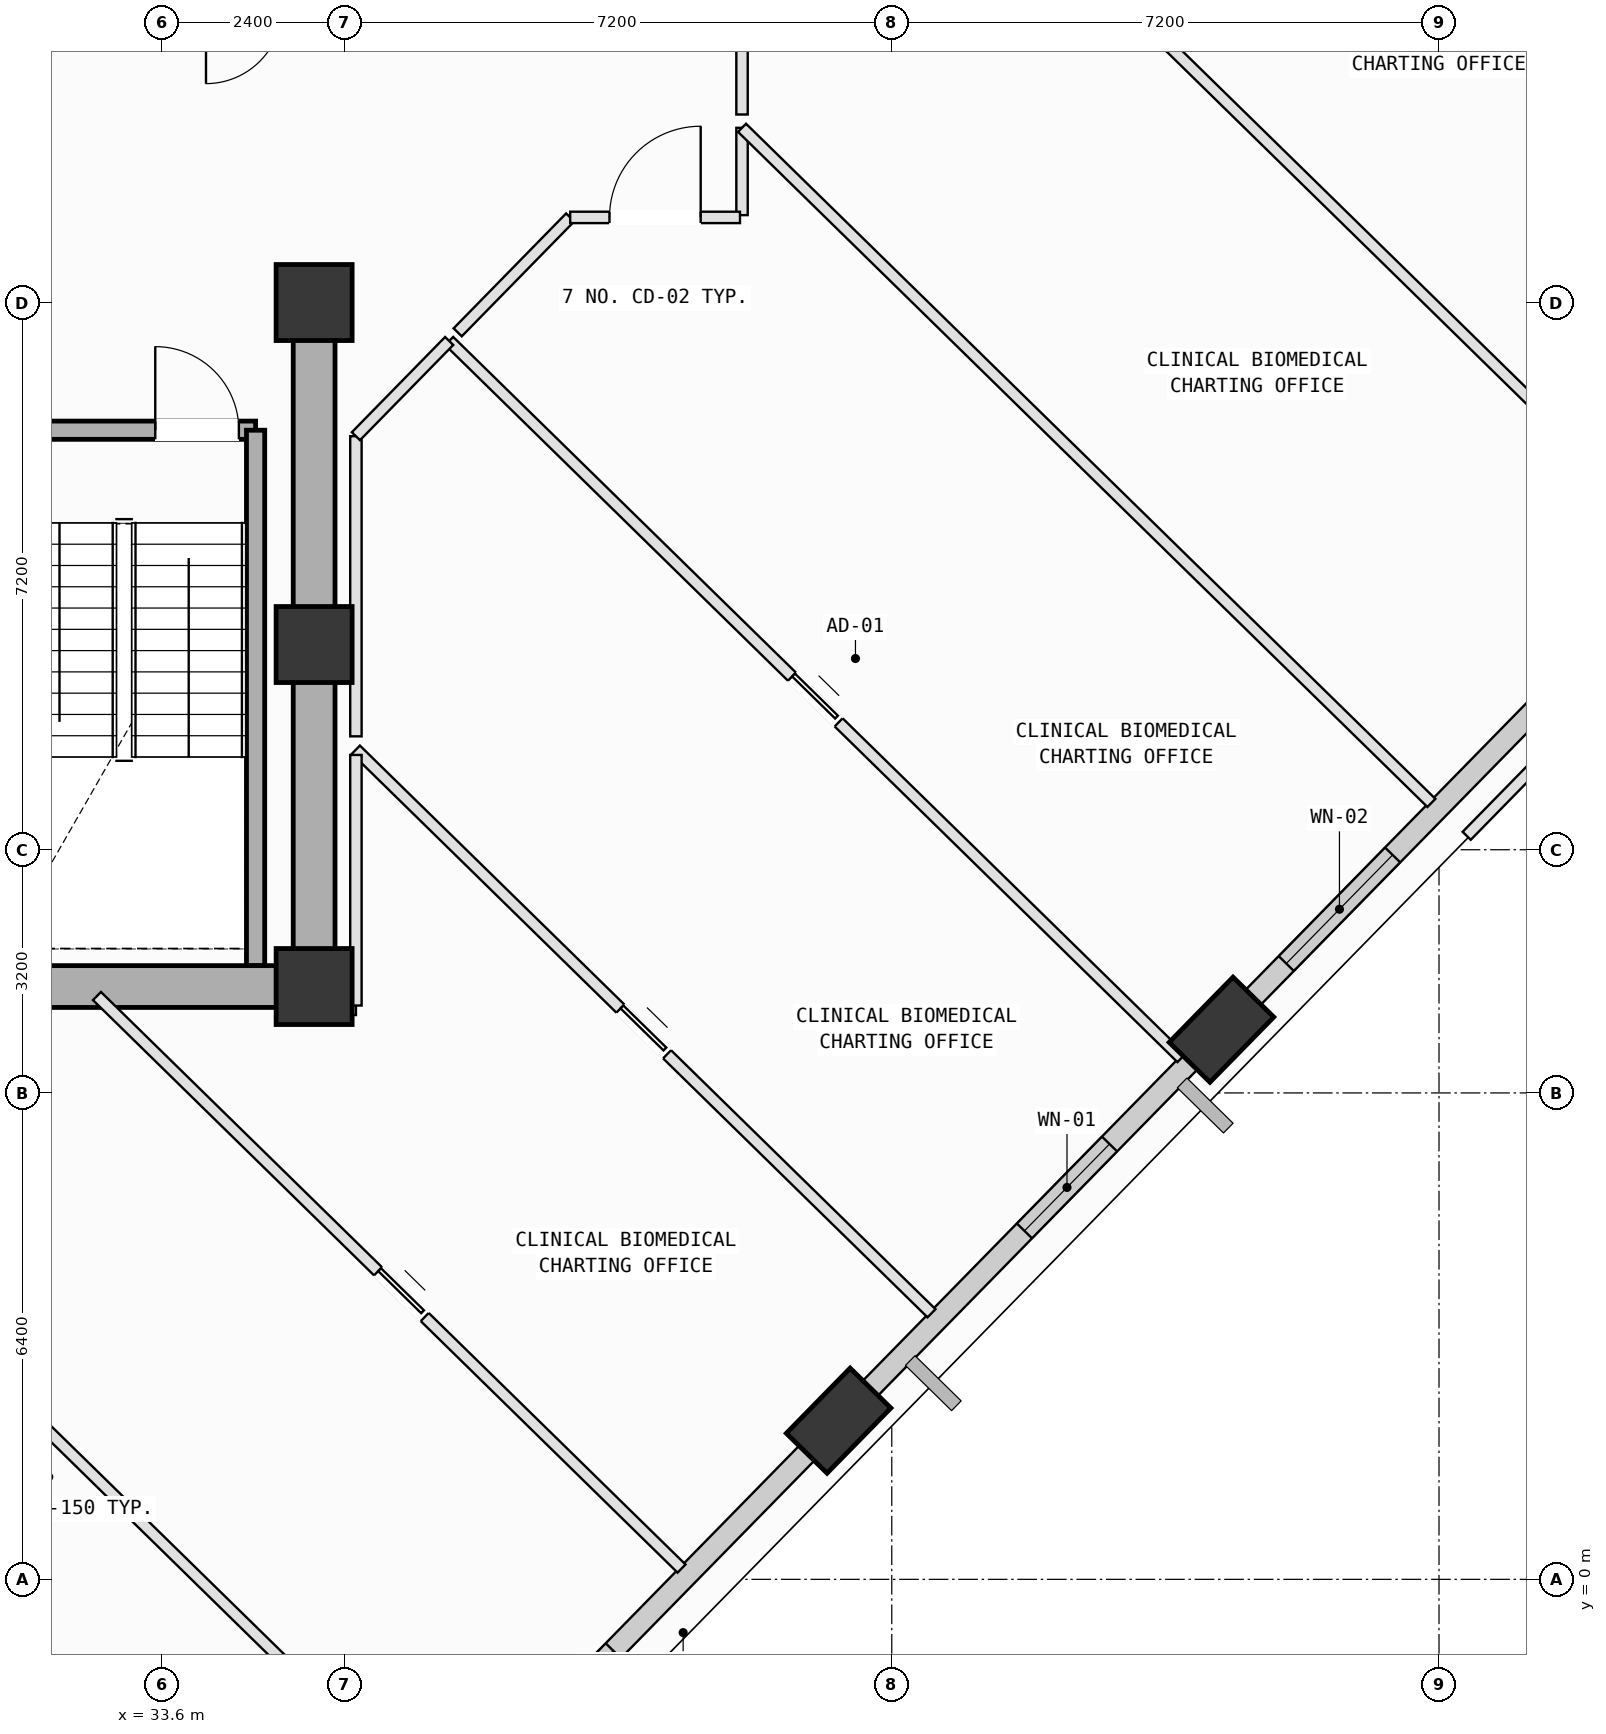
"""IFC4 building model, lengths in metres.
Left out: names, types, materials, properties, quantities, classifications, styles, units other than length and angle.
Written with IfcOpenShell. Run it as: python <this file> out.ifc"""

import sys

from ifc_helpers import new_model, si_unit, direction, frame, frame_2d, origin, origin_2d, place, context, subcontext, project, spatial, rectangle, extrude, element, fill, save


model = new_model("IFC4")
c1 = context("Model", 3, precision=1e-05, world=origin(), true_north=direction((0.0, 1.0)))
c2 = subcontext(c1, "Body", "Model", "MODEL_VIEW")
j1 = project(units=[si_unit("LENGTHUNIT", "METRE"), si_unit("PLANEANGLEUNIT", "RADIAN")], contexts=[c1])
p1 = place(None, origin())
s1 = spatial("IfcSite", under=j1, at=p1, CompositionType="ELEMENT")
p2 = place(p1, origin())
s2 = spatial("IfcBuilding", under=s1, at=p2, CompositionType="ELEMENT")
p3 = place(p2, frame((0.0, 0.0, 219.2)))
s3 = spatial("IfcBuildingStorey", under=s2, at=p3, CompositionType="ELEMENT", Elevation=219.2)
for number, where, z_axis, x_axis in (
    (1, (35.6, 7.8, 0.0), (0.0, 0.0, 1.0), (1.0, 0.0, 0.0)),
    (2, (35.6, 12.3, 0.0), (0.0, 0.0, 1.0), (1.0, 0.0, 0.0)),
    (3, (35.6, 16.8, 0.0), (0.0, 0.0, 1.0), (1.0, 0.0, 0.0)),
):
    element("IfcColumn", number, at=place(p3, frame(where, z_axis=z_axis, x_axis=x_axis)), inside=s3, PredefinedType="COLUMN", context=c2, shape_type="SweptSolid", body=[
        extrude(rectangle(XDim=1.0, YDim=1.0, at=origin_2d()), origin(), (0.0, 0.0, 1.0), 4.0),
    ])
p4 = place(p3, frame((42.5, 2.088, 0.002), z_axis=(0.093359989654, 0.037441245851, 0.994928170996), x_axis=(-0.92020095094, 0.384792535782, 0.071867338176)))
e4 = element("IfcColumn", 4, at=p4, inside=s3, PredefinedType="COLUMN", context=c2, shape_type="SweptSolid", body=[
    extrude(rectangle(XDim=1.2, YDim=0.75, at=origin_2d()), origin(), (0.0, 0.0, 1.0), 4.017),
])
p5 = place(p3, frame((47.538, 7.232, 0.002), z_axis=(0.07202153767, 0.058091696347, 0.995709924088), x_axis=(-0.992992369132, 0.097957283844, 0.066109949232)))
e5 = element("IfcColumn", 5, at=p5, inside=s3, PredefinedType="COLUMN", context=c2, shape_type="SweptSolid", body=[
    extrude(rectangle(XDim=1.2, YDim=0.75, at=origin_2d()), origin(), (0.0, 0.0, 1.0), 4.014),
])
p6 = place(p3, frame((42.358, 1.942, 0.0), z_axis=(0.0, 0.0, 1.0), x_axis=(-0.699673993546, -0.714462247257, 0.0)))
e6 = element("IfcWall", 6, at=p6, inside=s3, PredefinedType="SOLIDWALL", context=c2, shape_type="SweptSolid", body=[
    extrude(rectangle(XDim=6.438, YDim=0.28, at=frame_2d((3.219, 0.0))), origin(), (0.0, 0.0, 1.0), 3.265),
])
p7 = place(p6, frame((4.033, 0.0, 0.75)))
e7 = element("IfcOpeningElement", 7, at=p7, cuts=e6, PredefinedType="OPENING", context=c2, shape_type="SweptSolid", body=[
    extrude(rectangle(XDim=1.2, YDim=1.75, at=frame_2d((0.6, 0.875))), frame((0.0, 0.15, 0.0), z_axis=(0.0, -1.0, 0.0), x_axis=(1.0, 0.0, 0.0)), (0.0, 0.0, 1.0), 0.3),
])
p8 = place(p3, frame((47.389, 7.08, 0.0), z_axis=(0.0, 0.0, 1.0), x_axis=(-0.699664064336, -0.714471970812, 0.0)))
e8 = element("IfcWall", 8, at=p8, inside=s3, PredefinedType="SOLIDWALL", context=c2, shape_type="SweptSolid", body=[
    extrude(rectangle(XDim=6.414, YDim=0.28, at=frame_2d((3.207, 0.0))), origin(), (0.0, 0.0, 1.0), 3.265),
])
p9 = place(p8, frame((1.893, 0.0, 0.75)))
e9 = element("IfcOpeningElement", 9, at=p9, cuts=e8, PredefinedType="OPENING", context=c2, shape_type="SweptSolid", body=[
    extrude(rectangle(XDim=1.6, YDim=1.95, at=frame_2d((0.8, 0.975))), frame((0.0, 0.15, 0.0), z_axis=(0.0, -1.0, 0.0), x_axis=(1.0, 0.0, 0.0)), (0.0, 0.0, 1.0), 0.3),
])
p10 = place(p3, frame((52.427, 12.225, 0.0), z_axis=(0.0, 0.0, 1.0), x_axis=(-0.699656404434, -0.714479471877, 0.0)))
e10 = element("IfcWall", 10, at=p10, inside=s3, PredefinedType="SOLIDWALL", context=c2, shape_type="SweptSolid", body=[
    extrude(rectangle(XDim=6.407, YDim=0.28, at=frame_2d((3.204, 0.0))), origin(), (0.0, 0.0, 1.0), 3.265),
])
p11 = place(p10, frame((3.77, 0.0, 0.75)))
e11 = element("IfcOpeningElement", 11, at=p11, cuts=e10, PredefinedType="OPENING", context=c2, shape_type="SweptSolid", body=[
    extrude(rectangle(XDim=2.0, YDim=1.95, at=frame_2d((1.0, 0.975))), frame((0.0, 0.15, 0.0), z_axis=(0.0, -1.0, 0.0), x_axis=(1.0, 0.0, 0.0)), (0.0, 0.0, 1.0), 0.3),
])
p12 = place(p3, frame((30.265, 19.465, 0.0), z_axis=(0.0, 0.0, 1.0), x_axis=(0.699674545586, 0.714461706643, 0.0)))
e12 = element("IfcWall", 12, at=p12, inside=s3, PredefinedType="SOLIDWALL", context=c2, shape_type="SweptSolid", body=[
    extrude(rectangle(XDim=6.158, YDim=0.28, at=frame_2d((3.079, 0.0))), origin(), (0.0, 0.0, 1.0), 3.165),
])
p13 = place(p12, frame((3.403, 0.0, 0.75)))
e13 = element("IfcOpeningElement", 13, at=p13, cuts=e12, PredefinedType="OPENING", context=c2, shape_type="SweptSolid", body=[
    extrude(rectangle(XDim=1.8, YDim=2.05, at=frame_2d((0.9, 1.025))), frame((0.0, 0.15, 0.0), z_axis=(0.0, -1.0, 0.0), x_axis=(1.0, 0.0, 0.0)), (0.0, 0.0, 1.0), 0.3),
])
p14 = place(p3, frame((31.37, 15.12, 0.0), z_axis=(0.0, 0.0, 1.0), x_axis=(1.0, 0.0, 0.0)))
e14 = element("IfcWall", 14, at=p14, inside=s3, PredefinedType="SOLIDWALL", context=c2, shape_type="SweptSolid", body=[
    extrude(rectangle(XDim=3.46, YDim=0.24, at=frame_2d((1.73, 0.0))), origin(), (0.0, 0.0, 1.0), 3.78),
])
p15 = place(p14, frame((2.14, 0.0, 0.0)))
e15 = element("IfcOpeningElement", 15, at=p15, cuts=e14, PredefinedType="OPENING", context=c2, shape_type="SweptSolid", body=[
    extrude(rectangle(XDim=1.1, YDim=2.15, at=frame_2d((0.55, 1.075))), frame((0.0, 0.13, 0.0), z_axis=(0.0, -1.0, 0.0), x_axis=(1.0, 0.0, 0.0)), (0.0, 0.0, 1.0), 0.26),
])
p16 = place(p3, frame((34.83, 15.12, 0.0), z_axis=(0.0, 0.0, 1.0), x_axis=(0.0, -1.0, 0.0)))
e16 = element("IfcWall", 16, at=p16, inside=s3, PredefinedType="SOLIDWALL", context=c2, shape_type="SweptSolid", body=[
    extrude(rectangle(XDim=7.045, YDim=0.24, at=frame_2d((3.522, 0.0))), origin(), (0.0, 0.0, 1.0), 3.78),
])
p17 = place(p3, frame((24.8, 7.8, 0.0), z_axis=(0.0, 0.0, 1.0), x_axis=(1.0, 0.0, 0.0)))
e17 = element("IfcWall", 17, at=p17, inside=s3, PredefinedType="SHEAR", context=c2, shape_type="SweptSolid", body=[
    extrude(rectangle(XDim=10.8, YDim=0.55, at=frame_2d((5.4, 0.0))), origin(), (0.0, 0.0, 1.0), 3.78),
])
p18 = place(p3, frame((35.6, 7.8, 0.0), z_axis=(0.0, 0.0, 1.0), x_axis=(0.0, 1.0, 0.0)))
e18 = element("IfcWall", 18, at=p18, inside=s3, PredefinedType="SHEAR", context=c2, shape_type="SweptSolid", body=[
    extrude(rectangle(XDim=9.0, YDim=0.55, at=frame_2d((4.5, 0.0))), origin(), (0.0, 0.0, 1.0), 3.78),
])
p19 = place(p3, frame((37.259, -3.101, 0.0), z_axis=(0.0, 0.0, 1.0), x_axis=(-0.714463260908, 0.699672958469, 0.0)))
e19 = element("IfcWall", 19, at=p19, inside=s3, PredefinedType="PARTITIONING", context=c2, shape_type="SweptSolid", body=[
    extrude(rectangle(XDim=13.585, YDim=0.15, at=frame_2d((6.792, 0.0))), origin(), (0.0, 0.0, 1.0), 3.78),
])
p20 = place(p3, frame((32.743, 7.675, 0.0), z_axis=(0.0, 0.0, 1.0), x_axis=(0.714416186627, -0.699721024613, 0.0)))
e20 = element("IfcWall", 20, at=p20, inside=s3, PredefinedType="PARTITIONING", context=c2, shape_type="SweptSolid", body=[
    extrude(rectangle(XDim=10.766, YDim=0.15, at=frame_2d((5.383, 0.0))), origin(), (0.0, 0.0, 1.0), 3.78),
])
p21 = place(p20, frame((5.176, 0.0, 0.0)))
e21 = element("IfcOpeningElement", 21, at=p21, cuts=e20, PredefinedType="OPENING", context=c2, shape_type="SweptSolid", body=[
    extrude(rectangle(XDim=0.86, YDim=2.06, at=frame_2d((0.43, 1.03))), frame((0.0, 0.085, 0.0), z_axis=(0.0, -1.0, 0.0), x_axis=(1.0, 0.0, 0.0)), (0.0, 0.0, 1.0), 0.17),
])
p22 = place(p3, frame((36.15, 10.917, 0.0), z_axis=(0.0, 0.0, 1.0), x_axis=(0.71447324437, -0.699662763822, 0.0)))
e22 = element("IfcWall", 22, at=p22, inside=s3, PredefinedType="PARTITIONING", context=c2, shape_type="SweptSolid", body=[
    extrude(rectangle(XDim=10.599, YDim=0.15, at=frame_2d((5.3, 0.0))), origin(), (0.0, 0.0, 1.0), 3.78),
])
p23 = place(p22, frame((4.87, 0.0, 0.0)))
e23 = element("IfcOpeningElement", 23, at=p23, cuts=e22, PredefinedType="OPENING", context=c2, shape_type="SweptSolid", body=[
    extrude(rectangle(XDim=0.86, YDim=2.06, at=frame_2d((0.43, 1.03))), frame((0.0, 0.085, 0.0), z_axis=(0.0, -1.0, 0.0), x_axis=(1.0, 0.0, 0.0)), (0.0, 0.0, 1.0), 0.17),
])
p24 = place(p3, frame((43.067, 2.337, 0.0), z_axis=(0.0, 0.0, 1.0), x_axis=(-0.700014966986, -0.714128171966, 0.0)))
e24 = element("IfcWall", 24, at=p24, inside=s3, PredefinedType="PARTITIONING", context=c2, shape_type="SweptSolid", body=[
    extrude(rectangle(XDim=0.779, YDim=0.15, at=frame_2d((0.389, 0.0))), origin(), (0.0, 0.0, 1.0), 3.265),
])
p25 = place(p3, frame((35.6, 7.5, 0.0), z_axis=(0.0, 0.0, 1.0), x_axis=(1.0, 0.0, 0.0)))
e25 = element("IfcWall", 25, at=p25, inside=s3, PredefinedType="PARTITIONING", context=c2, shape_type="SweptSolid", body=[
    extrude(rectangle(XDim=0.55, YDim=0.15, at=frame_2d((0.275, 0.0))), origin(), (0.0, 0.0, 1.0), 3.78),
])
p26 = place(p3, frame((36.15, 7.55, 0.0), z_axis=(0.0, 0.0, 1.0), x_axis=(0.0, 1.0, 0.0)))
e26 = element("IfcWall", 26, at=p26, inside=s3, PredefinedType="PARTITIONING", context=c2, shape_type="SweptSolid", body=[
    extrude(rectangle(XDim=3.297, YDim=0.15, at=frame_2d((1.648, 0.0))), origin(), (0.0, 0.0, 1.0), 3.78),
])
p27 = place(p3, frame((37.377, 16.294, 0.0), z_axis=(0.0, 0.0, 1.0), x_axis=(0.714446126833, -0.699690454311, 0.0)))
e27 = element("IfcWall", 27, at=p27, inside=s3, PredefinedType="PARTITIONING", context=c2, shape_type="SweptSolid", body=[
    extrude(rectangle(XDim=13.485, YDim=0.15, at=frame_2d((6.742, 0.0))), origin(), (0.0, 0.0, 1.0), 3.78),
])
p28 = place(p27, frame((6.312, 0.0, 0.0)))
e28 = element("IfcOpeningElement", 28, at=p28, cuts=e27, PredefinedType="OPENING", context=c2, shape_type="SweptSolid", body=[
    extrude(rectangle(XDim=0.86, YDim=2.06, at=frame_2d((0.43, 1.03))), frame((0.0, 0.085, 0.0), z_axis=(0.0, -1.0, 0.0), x_axis=(1.0, 0.0, 0.0)), (0.0, 0.0, 1.0), 0.17),
])
p29 = place(p3, frame((36.15, 11.092, 0.0), z_axis=(0.0, 0.0, 1.0), x_axis=(0.0, 1.0, 0.0)))
e29 = element("IfcWall", 29, at=p29, inside=s3, PredefinedType="PARTITIONING", context=c2, shape_type="SweptSolid", body=[
    extrude(rectangle(XDim=3.949, YDim=0.15, at=frame_2d((1.975, 0.0))), origin(), (0.0, 0.0, 1.0), 3.78),
])
p30 = place(p3, frame((36.15, 15.041, 0.0), z_axis=(0.0, 0.0, 1.0), x_axis=(0.699689939296, 0.714446631211, 0.0)))
e30 = element("IfcWall", 30, at=p30, inside=s3, PredefinedType="PARTITIONING", context=c2, shape_type="SweptSolid", body=[
    extrude(rectangle(XDim=1.754, YDim=0.15, at=frame_2d((0.877, 0.0))), origin(), (0.0, 0.0, 1.0), 3.78),
])
p31 = place(p3, frame((41.23, 17.95, 0.0), z_axis=(0.0, 0.0, 1.0), x_axis=(0.0, 1.0, 0.0)))
e31 = element("IfcWall", 31, at=p31, inside=s3, PredefinedType="PARTITIONING", context=c2, shape_type="SweptSolid", body=[
    extrude(rectangle(XDim=1.149, YDim=0.15, at=frame_2d((0.575, 0.0))), origin(), (0.0, 0.0, 1.0), 3.78),
])
p32 = place(p3, frame((41.23, 19.099, 0.0), z_axis=(0.0, 0.0, 1.0), x_axis=(0.714433717365, -0.699703125255, 0.0)))
e32 = element("IfcWall", 32, at=p32, inside=s3, PredefinedType="PARTITIONING", context=c2, shape_type="SweptSolid", body=[
    extrude(rectangle(XDim=12.696, YDim=0.15, at=frame_2d((6.348, 0.0))), origin(), (0.0, 0.0, 1.0), 3.78),
])
p33 = place(p3, frame((48.109, 7.487, 0.0), z_axis=(0.0, 0.0, 1.0), x_axis=(-0.698757817186, -0.715358310863, 0.0)))
e33 = element("IfcWall", 33, at=p33, inside=s3, PredefinedType="PARTITIONING", context=c2, shape_type="SweptSolid", body=[
    extrude(rectangle(XDim=0.794, YDim=0.15, at=frame_2d((0.397, 0.0))), origin(), (0.0, 0.0, 1.0), 3.265),
])
p34 = place(p3, frame((37.489, 16.408, 0.0), z_axis=(0.0, 0.0, 1.0), x_axis=(0.699508189246, 0.714624581986, 0.0)))
e34 = element("IfcWall", 34, at=p34, inside=s3, PredefinedType="PARTITIONING", context=c2, shape_type="SweptSolid", body=[
    extrude(rectangle(XDim=2.116, YDim=0.15, at=frame_2d((1.058, 0.0))), origin(), (0.0, 0.0, 1.0), 3.78),
])
p35 = place(p3, frame((38.969, 17.92, 0.0), z_axis=(0.0, 0.0, 1.0), x_axis=(1.0, 0.0, 0.0)))
e35 = element("IfcWall", 35, at=p35, inside=s3, PredefinedType="PARTITIONING", context=c2, shape_type="SweptSolid", body=[
    extrude(rectangle(XDim=2.234, YDim=0.15, at=frame_2d((1.117, 0.0))), origin(), (0.0, 0.0, 1.0), 3.165),
])
p36 = place(p35, frame((0.517, 0.0, 0.0)))
e36 = element("IfcOpeningElement", 36, at=p36, cuts=e35, PredefinedType="OPENING", context=c2, shape_type="SweptSolid", body=[
    extrude(rectangle(XDim=1.2, YDim=2.15, at=frame_2d((0.6, 1.075))), frame((0.0, 0.085, 0.0), z_axis=(0.0, -1.0, 0.0), x_axis=(1.0, 0.0, 0.0)), (0.0, 0.0, 1.0), 0.17),
])
p37 = place(p3, frame((43.954, 23.01, 0.0), z_axis=(0.0, 0.0, 1.0), x_axis=(0.714437262996, -0.699699504961, 0.0)))
e37 = element("IfcWall", 37, at=p37, inside=s3, PredefinedType="PARTITIONING", context=c2, shape_type="SweptSolid", body=[
    extrude(rectangle(XDim=13.484, YDim=0.15, at=frame_2d((6.742, 0.0))), origin(), (0.0, 0.0, 1.0), 3.415),
])
p38 = place(p3, frame((41.23, 19.274, 0.0), z_axis=(0.0, 0.0, 1.0), x_axis=(0.0, 1.0, 0.0)))
e38 = element("IfcWall", 38, at=p38, inside=s3, PredefinedType="PARTITIONING", context=c2, shape_type="SweptSolid", body=[
    extrude(rectangle(XDim=0.954, YDim=0.15, at=frame_2d((0.477, 0.0))), origin(), (0.0, 0.0, 1.0), 3.78),
])
p39 = place(p3, frame((47.242, 26.368, 0.0), z_axis=(0.0, 0.0, 1.0), x_axis=(0.714409925355, -0.699727417323, 0.0)))
e39 = element("IfcWall", 39, at=p39, inside=s3, PredefinedType="PARTITIONING", context=c2, shape_type="SweptSolid", body=[
    extrude(rectangle(XDim=13.485, YDim=0.15, at=frame_2d((6.743, 0.0))), origin(), (0.0, 0.0, 1.0), 3.78),
])
p40 = place(p3, frame((55.095, 14.206, 0.0), z_axis=(0.0, 0.0, 1.0), x_axis=(-0.699633601264, -0.714501801245, 0.0)))
e40 = element("IfcWall", 40, at=p40, inside=s3, PredefinedType="PARTITIONING", context=c2, shape_type="SweptSolid", body=[
    extrude(rectangle(XDim=6.19, YDim=0.15, at=frame_2d((3.095, 0.0))), origin(), (0.0, 0.0, 1.0), 3.78),
])
p41 = place(p7, origin())
e41 = element("IfcWindow", 41, at=p41, inside=s3, PartitioningType="SINGLE_PANEL", PredefinedType="WINDOW", context=c2, shape_type="SweptSolid", body=[
    extrude(rectangle(XDim=1.2, YDim=1.75, at=frame_2d((0.6, 0.875))), frame((0.0, 0.03, 0.0), z_axis=(0.0, -1.0, 0.0), x_axis=(1.0, 0.0, 0.0)), (0.0, 0.0, 1.0), 0.06),
])
fill(e7, e41)
p42 = place(p9, origin())
e42 = element("IfcWindow", 42, at=p42, inside=s3, PartitioningType="SINGLE_PANEL", PredefinedType="WINDOW", context=c2, shape_type="SweptSolid", body=[
    extrude(rectangle(XDim=1.6, YDim=1.95, at=frame_2d((0.8, 0.975))), frame((0.0, 0.03, 0.0), z_axis=(0.0, -1.0, 0.0), x_axis=(1.0, 0.0, 0.0)), (0.0, 0.0, 1.0), 0.06),
])
fill(e9, e42)
p43 = place(p11, origin())
e43 = element("IfcWindow", 43, at=p43, inside=s3, PartitioningType="SINGLE_PANEL", PredefinedType="WINDOW", context=c2, shape_type="SweptSolid", body=[
    extrude(rectangle(XDim=2.0, YDim=1.95, at=frame_2d((1.0, 0.975))), frame((0.0, 0.03, 0.0), z_axis=(0.0, -1.0, 0.0), x_axis=(1.0, 0.0, 0.0)), (0.0, 0.0, 1.0), 0.06),
])
fill(e11, e43)
p44 = place(p15, origin())
e44 = element("IfcDoor", 44, at=p44, inside=s3, OperationType="SINGLE_SWING_LEFT", PredefinedType="DOOR", context=c2, shape_type="SweptSolid", body=[
    extrude(rectangle(XDim=1.1, YDim=2.15, at=frame_2d((0.55, 1.075))), frame((0.0, 0.025, 0.0), z_axis=(0.0, -1.0, 0.0), x_axis=(1.0, 0.0, 0.0)), (0.0, 0.0, 1.0), 0.05),
])
fill(e15, e44)
p45 = place(p36, origin())
e45 = element("IfcDoor", 45, at=p45, inside=s3, OperationType="SINGLE_SWING_RIGHT", PredefinedType="DOOR", context=c2, shape_type="SweptSolid", body=[
    extrude(rectangle(XDim=1.2, YDim=2.15, at=frame_2d((0.6, 1.075))), frame((0.0, 0.025, 0.0), z_axis=(0.0, -1.0, 0.0), x_axis=(1.0, 0.0, 0.0)), (0.0, 0.0, 1.0), 0.05),
])
fill(e36, e45)
p46 = place(p28, origin())
e46 = element("IfcDoor", 46, at=p46, inside=s3, OperationType="SLIDING_TO_LEFT", PredefinedType="DOOR", context=c2, shape_type="SweptSolid", body=[
    extrude(rectangle(XDim=0.86, YDim=2.06, at=frame_2d((0.43, 1.03))), frame((0.0, 0.025, 0.0), z_axis=(0.0, -1.0, 0.0), x_axis=(1.0, 0.0, 0.0)), (0.0, 0.0, 1.0), 0.05),
])
fill(e28, e46)
p47 = place(p23, origin())
e47 = element("IfcDoor", 47, at=p47, inside=s3, OperationType="SLIDING_TO_LEFT", PredefinedType="DOOR", context=c2, shape_type="SweptSolid", body=[
    extrude(rectangle(XDim=0.86, YDim=2.06, at=frame_2d((0.43, 1.03))), frame((0.0, 0.025, 0.0), z_axis=(0.0, -1.0, 0.0), x_axis=(1.0, 0.0, 0.0)), (0.0, 0.0, 1.0), 0.05),
])
fill(e23, e47)
p48 = place(p21, origin())
e48 = element("IfcDoor", 48, at=p48, inside=s3, OperationType="SLIDING_TO_LEFT", PredefinedType="DOOR", context=c2, shape_type="SweptSolid", body=[
    extrude(rectangle(XDim=0.86, YDim=2.06, at=frame_2d((0.43, 1.03))), frame((0.0, 0.025, 0.0), z_axis=(0.0, -1.0, 0.0), x_axis=(1.0, 0.0, 0.0)), (0.0, 0.0, 1.0), 0.05),
])
fill(e21, e48)
save(model, sys.argv[1])
